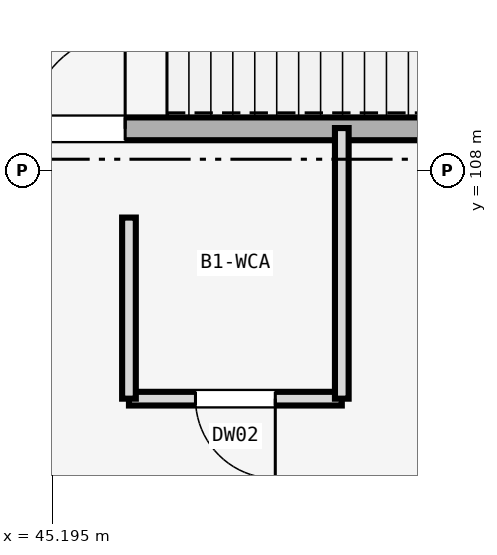
"""IFC4 building model, lengths in metres.
Left out: names, types, materials, properties, quantities, classifications, styles, units other than length and angle.
Written with IfcOpenShell. Run it as: python <this file> out.ifc"""

import sys

from ifc_helpers import new_model, si_unit, direction, frame, frame_2d, origin, place, context, subcontext, project, spatial, rectangle, extrude, element, fill, save


model = new_model("IFC4")
c1 = context("Model", 3, precision=1e-05, world=origin(), true_north=direction((0.0, 1.0)))
c2 = subcontext(c1, "Body", "Model", "MODEL_VIEW")
j1 = project(units=[si_unit("LENGTHUNIT", "METRE"), si_unit("PLANEANGLEUNIT", "RADIAN")], contexts=[c1])
p1 = place(None, origin())
s1 = spatial("IfcSite", under=j1, at=p1, CompositionType="ELEMENT")
p2 = place(p1, origin())
s2 = spatial("IfcBuilding", under=s1, at=p2, CompositionType="ELEMENT")
p3 = place(p2, frame((0.0, 0.0, -5.4)))
s3 = spatial("IfcBuildingStorey", under=s2, at=p3, CompositionType="ELEMENT", Elevation=-5.4)
p4 = place(p3, frame((43.8, 108.55, 0.0), z_axis=(0.0, 0.0, 1.0), x_axis=(1.0, 0.0, 0.0)))
e1 = element("IfcWall", 1, at=p4, inside=s3, PredefinedType="SHEAR", context=c2, shape_type="SweptSolid", body=[
    extrude(rectangle(XDim=12.0, YDim=0.3, at=frame_2d((6.0, 0.0))), origin(), (0.0, 0.0, 1.0), 5.4),
])
p5 = place(p4, frame((1.1, 0.0, 0.0)))
e2 = element("IfcOpeningElement", 2, at=p5, cuts=e1, PredefinedType="OPENING", context=c2, shape_type="SweptSolid", body=[
    extrude(rectangle(XDim=1.25, YDim=2.15, at=frame_2d((0.625, 1.075))), frame((0.0, 0.16, 0.0), z_axis=(0.0, -1.0, 0.0), x_axis=(1.0, 0.0, 0.0)), (0.0, 0.0, 1.0), 0.32),
])
p6 = place(p3, frame((49.0, 105.0, 0.0), z_axis=(0.0, 0.0, 1.0), x_axis=(-1.0, 0.0, 0.0)))
e3 = element("IfcWall", 3, at=p6, inside=s3, PredefinedType="PARTITIONING", context=c2, shape_type="SweptSolid", body=[
    extrude(rectangle(XDim=2.8, YDim=0.18, at=frame_2d((1.4, 0.0))), origin(), (0.0, 0.0, 1.0), 4.05),
])
p7 = place(p6, frame((0.875, 0.0, 0.0)))
e4 = element("IfcOpeningElement", 4, at=p7, cuts=e3, PredefinedType="OPENING", context=c2, shape_type="SweptSolid", body=[
    extrude(rectangle(XDim=1.05, YDim=2.1, at=frame_2d((0.525, 1.05))), frame((0.0, 0.1, 0.0), z_axis=(0.0, -1.0, 0.0), x_axis=(1.0, 0.0, 0.0)), (0.0, 0.0, 1.0), 0.2),
])
p8 = place(p3, frame((46.2, 105.0, 0.0), z_axis=(0.0, 0.0, 1.0), x_axis=(0.0, 1.0, 0.0)))
e5 = element("IfcWall", 5, at=p8, inside=s3, PredefinedType="PARTITIONING", context=c2, shape_type="SweptSolid", body=[
    extrude(rectangle(XDim=2.383, YDim=0.18, at=frame_2d((1.191, 0.0))), origin(), (0.0, 0.0, 1.0), 4.05),
])
p9 = place(p3, frame((49.0, 108.56, 0.0), z_axis=(0.0, 0.0, 1.0), x_axis=(0.0, -1.0, 0.0)))
e6 = element("IfcWall", 6, at=p9, inside=s3, PredefinedType="PARTITIONING", context=c2, shape_type="SweptSolid", body=[
    extrude(rectangle(XDim=3.56, YDim=0.18, at=frame_2d((1.78, 0.0))), origin(), (0.0, 0.0, 1.0), 4.05),
])
p10 = place(p5, origin())
e7 = element("IfcDoor", 7, at=p10, inside=s3, OperationType="SINGLE_SWING_RIGHT", PredefinedType="DOOR", context=c2, shape_type="SweptSolid", body=[
    extrude(rectangle(XDim=1.25, YDim=2.15, at=frame_2d((0.625, 1.075))), frame((0.0, 0.025, 0.0), z_axis=(0.0, -1.0, 0.0), x_axis=(1.0, 0.0, 0.0)), (0.0, 0.0, 1.0), 0.05),
])
fill(e2, e7)
p11 = place(p7, origin())
e8 = element("IfcDoor", 8, at=p11, inside=s3, OperationType="SINGLE_SWING_LEFT", PredefinedType="DOOR", context=c2, shape_type="SweptSolid", body=[
    extrude(rectangle(XDim=1.05, YDim=2.1, at=frame_2d((0.525, 1.05))), frame((0.0, 0.025, 0.0), z_axis=(0.0, -1.0, 0.0), x_axis=(1.0, 0.0, 0.0)), (0.0, 0.0, 1.0), 0.05),
])
fill(e4, e8)
save(model, sys.argv[1])
